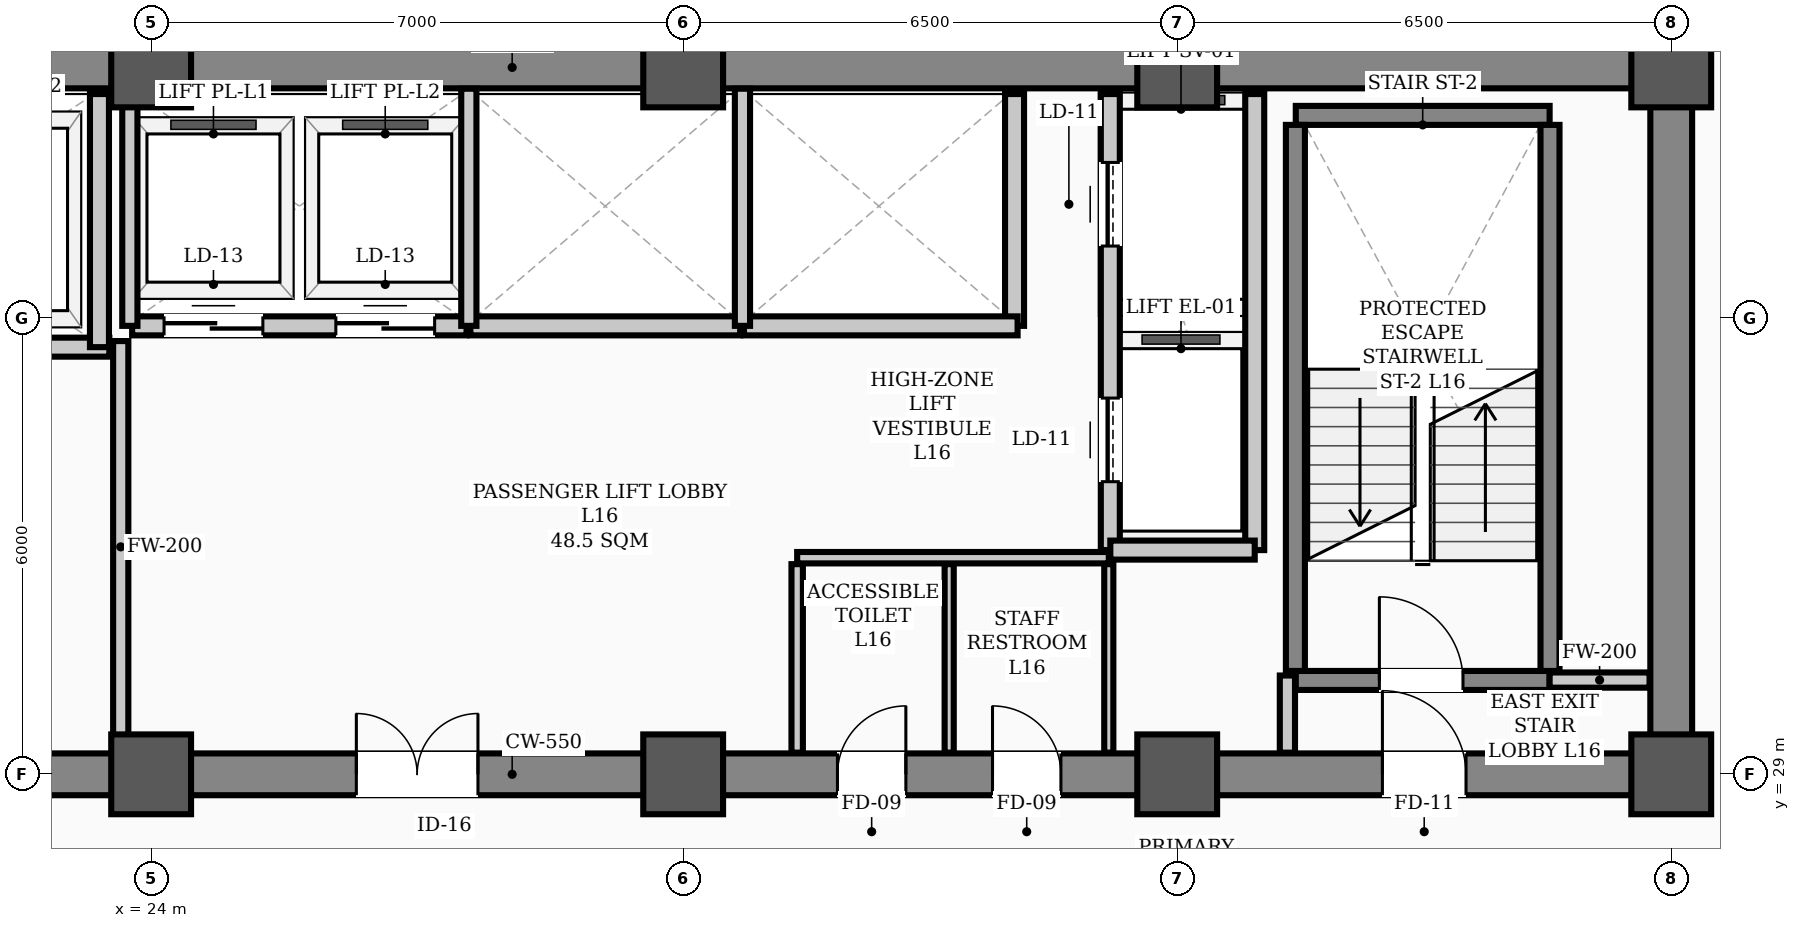
"""IFC4 building model, lengths in metres.
Left out: names, types, materials, properties, quantities, classifications, styles, units other than length and angle.
Written with IfcOpenShell. Run it as: python <this file> out.ifc"""

import sys

from ifc_helpers import new_model, si_unit, direction, frame, frame_2d, origin, origin_2d, place, context, subcontext, project, spatial, rectangle, hollow_rectangle, extrude, element, fill, save


model = new_model("IFC4")
c1 = context("Model", 3, precision=1e-05, world=origin(), true_north=direction((0.0, 1.0)))
c2 = subcontext(c1, "Body", "Model", "MODEL_VIEW")
j1 = project(units=[si_unit("LENGTHUNIT", "METRE"), si_unit("PLANEANGLEUNIT", "RADIAN")], contexts=[c1])
p1 = place(None, origin())
s1 = spatial("IfcSite", under=j1, at=p1, CompositionType="ELEMENT")
p2 = place(p1, origin())
s2 = spatial("IfcBuilding", under=s1, at=p2, CompositionType="ELEMENT")
p3 = place(p2, frame((0.0, 0.0, 65.5)))
s3 = spatial("IfcBuildingStorey", under=s2, at=p3, CompositionType="ELEMENT", Elevation=65.5)
for number, where, z_axis, x_axis in (
    (1, (24.0, 29.0, 0.0), (0.0, 0.0, 1.0), (1.0, 0.0, 0.0)),
    (2, (24.0, 38.3, 0.0), (0.0, 0.0, 1.0), (1.0, 0.0, 0.0)),
    (3, (31.0, 29.0, 0.0), (0.0, 0.0, 1.0), (1.0, 0.0, 0.0)),
    (4, (31.0, 38.3, 0.0), (0.0, 0.0, 1.0), (1.0, 0.0, 0.0)),
    (5, (37.5, 29.0, 0.0), (0.0, 0.0, 1.0), (1.0, 0.0, 0.0)),
    (6, (37.5, 38.3, 0.0), (0.0, 0.0, 1.0), (1.0, 0.0, 0.0)),
    (7, (44.0, 29.0, 0.0), (0.0, 0.0, 1.0), (1.0, 0.0, 0.0)),
    (8, (44.0, 38.3, 0.0), (0.0, 0.0, 1.0), (1.0, 0.0, 0.0)),
):
    element("IfcColumn", number, at=place(p3, frame(where, z_axis=z_axis, x_axis=x_axis)), inside=s3, PredefinedType="COLUMN", context=c2, shape_type="SweptSolid", body=[
        extrude(hollow_rectangle(XDim=1.05, YDim=1.05, WallThickness=0.038, InnerFilletRadius=0.019, OuterFilletRadius=0.057, at=origin_2d()), origin(), (0.0, 0.0, 1.0), 3.9),
    ])
p4 = place(p3, frame((13.5, 29.0, 0.0), z_axis=(0.0, 0.0, 1.0), x_axis=(1.0, 0.0, 0.0)))
e9 = element("IfcWall", 9, at=p4, inside=s3, PredefinedType="SHEAR", context=c2, shape_type="SweptSolid", body=[
    extrude(rectangle(XDim=30.5, YDim=0.55, at=frame_2d((15.25, 0.0))), origin(), (0.0, 0.0, 1.0), 3.72),
])
p5 = place(p4, frame((1.75, 0.0, 0.0)))
e10 = element("IfcOpeningElement", 10, at=p5, cuts=e9, PredefinedType="OPENING", context=c2, shape_type="SweptSolid", body=[
    extrude(rectangle(XDim=1.1, YDim=2.08, at=frame_2d((0.55, 1.04))), frame((0.0, 0.285, 0.0), z_axis=(0.0, -1.0, 0.0), x_axis=(1.0, 0.0, 0.0)), (0.0, 0.0, 1.0), 0.57),
])
p6 = place(p4, frame((26.7, 0.0, 0.0)))
e11 = element("IfcOpeningElement", 11, at=p6, cuts=e9, PredefinedType="OPENING", context=c2, shape_type="SweptSolid", body=[
    extrude(rectangle(XDim=1.1, YDim=2.08, at=frame_2d((0.55, 1.04))), frame((0.0, 0.285, 0.0), z_axis=(0.0, -1.0, 0.0), x_axis=(1.0, 0.0, 0.0)), (0.0, 0.0, 1.0), 0.57),
])
p7 = place(p4, frame((6.8, 0.0, 0.0)))
e12 = element("IfcOpeningElement", 12, at=p7, cuts=e9, PredefinedType="OPENING", context=c2, shape_type="SweptSolid", body=[
    extrude(rectangle(XDim=1.1, YDim=2.08, at=frame_2d((0.55, 1.04))), frame((0.0, 0.285, 0.0), z_axis=(0.0, -1.0, 0.0), x_axis=(1.0, 0.0, 0.0)), (0.0, 0.0, 1.0), 0.57),
])
p8 = place(p4, frame((13.2, 0.0, 0.0)))
e13 = element("IfcOpeningElement", 13, at=p8, cuts=e9, PredefinedType="OPENING", context=c2, shape_type="SweptSolid", body=[
    extrude(rectangle(XDim=1.6, YDim=2.08, at=frame_2d((0.8, 1.04))), frame((0.0, 0.285, 0.0), z_axis=(0.0, -1.0, 0.0), x_axis=(1.0, 0.0, 0.0)), (0.0, 0.0, 1.0), 0.57),
])
p9 = place(p4, frame((19.53, 0.0, 0.0)))
e14 = element("IfcOpeningElement", 14, at=p9, cuts=e9, PredefinedType="OPENING", context=c2, shape_type="SweptSolid", body=[
    extrude(rectangle(XDim=0.9, YDim=2.08, at=frame_2d((0.45, 1.04))), frame((0.0, 0.285, 0.0), z_axis=(0.0, -1.0, 0.0), x_axis=(1.0, 0.0, 0.0)), (0.0, 0.0, 1.0), 0.57),
])
p10 = place(p4, frame((21.57, 0.0, 0.0)))
e15 = element("IfcOpeningElement", 15, at=p10, cuts=e9, PredefinedType="OPENING", context=c2, shape_type="SweptSolid", body=[
    extrude(rectangle(XDim=0.9, YDim=2.08, at=frame_2d((0.45, 1.04))), frame((0.0, 0.285, 0.0), z_axis=(0.0, -1.0, 0.0), x_axis=(1.0, 0.0, 0.0)), (0.0, 0.0, 1.0), 0.57),
])
p11 = place(p3, frame((13.5, 38.3, 0.0), z_axis=(0.0, 0.0, 1.0), x_axis=(1.0, 0.0, 0.0)))
e16 = element("IfcWall", 16, at=p11, inside=s3, PredefinedType="SHEAR", context=c2, shape_type="SweptSolid", body=[
    extrude(rectangle(XDim=30.5, YDim=0.55, at=frame_2d((15.25, 0.0))), origin(), (0.0, 0.0, 1.0), 3.72),
])
p12 = place(p3, frame((44.0, 29.35, 0.0), z_axis=(0.0, 0.0, 1.0), x_axis=(0.0, 1.0, 0.0)))
e17 = element("IfcWall", 17, at=p12, inside=s3, PredefinedType="SHEAR", context=c2, shape_type="SweptSolid", body=[
    extrude(rectangle(XDim=8.6, YDim=0.55, at=frame_2d((4.3, 0.0))), origin(), (0.0, 0.0, 1.0), 3.72),
])
p13 = place(p3, frame((39.06, 30.235, 0.0), z_axis=(0.0, 0.0, 1.0), x_axis=(1.0, 0.0, 0.0)))
e18 = element("IfcWall", 18, at=p13, inside=s3, PredefinedType="STANDARD", context=c2, shape_type="SweptSolid", body=[
    extrude(rectangle(XDim=3.34, YDim=0.25, at=frame_2d((1.67, 0.0))), origin(), (0.0, 0.0, 1.0), 3.72),
])
p14 = place(p13, frame((1.1, 0.0, 0.0)))
e19 = element("IfcOpeningElement", 19, at=p14, cuts=e18, PredefinedType="OPENING", context=c2, shape_type="SweptSolid", body=[
    extrude(rectangle(XDim=1.1, YDim=2.08, at=frame_2d((0.55, 1.04))), frame((0.0, 0.135, 0.0), z_axis=(0.0, -1.0, 0.0), x_axis=(1.0, 0.0, 0.0)), (0.0, 0.0, 1.0), 0.27),
])
p15 = place(p3, frame((39.06, 37.669, 0.0), z_axis=(0.0, 0.0, 1.0), x_axis=(1.0, 0.0, 0.0)))
e20 = element("IfcWall", 20, at=p15, inside=s3, PredefinedType="STANDARD", context=c2, shape_type="SweptSolid", body=[
    extrude(rectangle(XDim=3.34, YDim=0.25, at=frame_2d((1.67, 0.0))), origin(), (0.0, 0.0, 1.0), 3.72),
])
for number, where, z_axis, x_axis in (
    (21, (39.055, 30.36, 0.0), (0.0, 0.0, 1.0), (0.0, 1.0, 0.0)),
    (22, (42.405, 30.36, 0.0), (0.0, 0.0, 1.0), (0.0, 1.0, 0.0)),
):
    element("IfcWall", number, at=place(p3, frame(where, z_axis=z_axis, x_axis=x_axis)), inside=s3, PredefinedType="STANDARD", context=c2, shape_type="SweptSolid", body=[
        extrude(rectangle(XDim=7.184, YDim=0.25, at=frame_2d((3.592, 0.0))), origin(), (0.0, 0.0, 1.0), 3.72),
    ])
p16 = place(p3, frame((18.1, 34.62, 0.0), z_axis=(0.0, 0.0, 1.0), x_axis=(1.0, 0.0, 0.0)))
e23 = element("IfcWall", 23, at=p16, inside=s3, PredefinedType="STANDARD", context=c2, shape_type="SweptSolid", body=[
    extrude(rectangle(XDim=5.35, YDim=0.25, at=frame_2d((2.675, 0.0))), origin(), (0.0, 0.0, 1.0), 3.72),
])
p17 = place(p16, frame((0.85, 0.0, 0.0)))
e24 = element("IfcOpeningElement", 24, at=p17, cuts=e23, PredefinedType="OPENING", context=c2, shape_type="SweptSolid", body=[
    extrude(rectangle(XDim=1.1, YDim=2.08, at=frame_2d((0.55, 1.04))), frame((0.0, 0.135, 0.0), z_axis=(0.0, -1.0, 0.0), x_axis=(1.0, 0.0, 0.0)), (0.0, 0.0, 1.0), 0.27),
])
p18 = place(p16, frame((3.45, 0.0, 0.0)))
e25 = element("IfcOpeningElement", 25, at=p18, cuts=e23, PredefinedType="OPENING", context=c2, shape_type="SweptSolid", body=[
    extrude(rectangle(XDim=1.1, YDim=2.08, at=frame_2d((0.55, 1.04))), frame((0.0, 0.135, 0.0), z_axis=(0.0, -1.0, 0.0), x_axis=(1.0, 0.0, 0.0)), (0.0, 0.0, 1.0), 0.27),
])
p19 = place(p3, frame((36.62, 31.95, 0.0), z_axis=(0.0, 0.0, 1.0), x_axis=(0.0, 1.0, 0.0)))
e26 = element("IfcWall", 26, at=p19, inside=s3, PredefinedType="STANDARD", context=c2, shape_type="SweptSolid", body=[
    extrude(rectangle(XDim=6.0, YDim=0.25, at=frame_2d((3.0, 0.0))), origin(), (0.0, 0.0, 1.0), 3.3),
])
p20 = place(p19, frame((0.9, 0.0, 0.0)))
e27 = element("IfcOpeningElement", 27, at=p20, cuts=e26, PredefinedType="OPENING", context=c2, shape_type="SweptSolid", body=[
    extrude(rectangle(XDim=1.1, YDim=2.08, at=frame_2d((0.55, 1.04))), frame((0.0, 0.135, 0.0), z_axis=(0.0, -1.0, 0.0), x_axis=(1.0, 0.0, 0.0)), (0.0, 0.0, 1.0), 0.27),
])
p21 = place(p19, frame((4.0, 0.0, 0.0)))
e28 = element("IfcOpeningElement", 28, at=p21, cuts=e26, PredefinedType="OPENING", context=c2, shape_type="SweptSolid", body=[
    extrude(rectangle(XDim=1.1, YDim=2.08, at=frame_2d((0.55, 1.04))), frame((0.0, 0.135, 0.0), z_axis=(0.0, -1.0, 0.0), x_axis=(1.0, 0.0, 0.0)), (0.0, 0.0, 1.0), 0.27),
])
p22 = place(p3, frame((38.52, 31.95, 0.0), z_axis=(0.0, 0.0, 1.0), x_axis=(0.0, 1.0, 0.0)))
e29 = element("IfcWall", 29, at=p22, inside=s3, PredefinedType="STANDARD", context=c2, shape_type="SweptSolid", body=[
    extrude(rectangle(XDim=6.0, YDim=0.25, at=frame_2d((3.0, 0.0))), origin(), (0.0, 0.0, 1.0), 3.3),
])
p23 = place(p3, frame((36.62, 31.95, 0.0), z_axis=(0.0, 0.0, 1.0), x_axis=(1.0, 0.0, 0.0)))
e30 = element("IfcWall", 30, at=p23, inside=s3, PredefinedType="STANDARD", context=c2, shape_type="SweptSolid", body=[
    extrude(rectangle(XDim=1.9, YDim=0.25, at=frame_2d((0.95, 0.0))), origin(), (0.0, 0.0, 1.0), 3.48),
])
p24 = place(p3, frame((23.32, 34.62, 0.0), z_axis=(0.0, 0.0, 1.0), x_axis=(0.0, 1.0, 0.0)))
e31 = element("IfcWall", 31, at=p24, inside=s3, PredefinedType="STANDARD", context=c2, shape_type="SweptSolid", body=[
    extrude(rectangle(XDim=3.33, YDim=0.25, at=frame_2d((1.665, 0.0))), origin(), (0.0, 0.0, 1.0), 3.3),
])
p25 = place(p3, frame((35.36, 34.9, 0.0), z_axis=(0.0, 0.0, 1.0), x_axis=(0.0, 1.0, 0.0)))
e32 = element("IfcWall", 32, at=p25, inside=s3, PredefinedType="STANDARD", context=c2, shape_type="SweptSolid", body=[
    extrude(rectangle(XDim=3.05, YDim=0.25, at=frame_2d((1.525, 0.0))), origin(), (0.0, 0.0, 1.0), 3.3),
])
p26 = place(p3, frame((23.75, 34.9, 0.0), z_axis=(0.0, 0.0, 1.0), x_axis=(1.0, 0.0, 0.0)))
e33 = element("IfcWall", 33, at=p26, inside=s3, PredefinedType="STANDARD", context=c2, shape_type="SweptSolid", body=[
    extrude(rectangle(XDim=4.4, YDim=0.25, at=frame_2d((2.2, 0.0))), origin(), (0.0, 0.0, 1.0), 3.72),
])
p27 = place(p26, frame((0.42, 0.0, 0.0)))
e34 = element("IfcOpeningElement", 34, at=p27, cuts=e33, PredefinedType="OPENING", context=c2, shape_type="SweptSolid", body=[
    extrude(rectangle(XDim=1.3, YDim=2.08, at=frame_2d((0.65, 1.04))), frame((0.0, 0.135, 0.0), z_axis=(0.0, -1.0, 0.0), x_axis=(1.0, 0.0, 0.0)), (0.0, 0.0, 1.0), 0.27),
])
p28 = place(p26, frame((2.68, 0.0, 0.0)))
e35 = element("IfcOpeningElement", 35, at=p28, cuts=e33, PredefinedType="OPENING", context=c2, shape_type="SweptSolid", body=[
    extrude(rectangle(XDim=1.3, YDim=2.08, at=frame_2d((0.65, 1.04))), frame((0.0, 0.135, 0.0), z_axis=(0.0, -1.0, 0.0), x_axis=(1.0, 0.0, 0.0)), (0.0, 0.0, 1.0), 0.27),
])
p29 = place(p3, frame((28.2, 34.9, 0.0), z_axis=(0.0, 0.0, 1.0), x_axis=(1.0, 0.0, 0.0)))
e36 = element("IfcWall", 36, at=p29, inside=s3, PredefinedType="STANDARD", context=c2, shape_type="SweptSolid", body=[
    extrude(rectangle(XDim=3.55, YDim=0.25, at=frame_2d((1.775, 0.0))), origin(), (0.0, 0.0, 1.0), 3.72),
])
p30 = place(p3, frame((31.8, 34.9, 0.0), z_axis=(0.0, 0.0, 1.0), x_axis=(1.0, 0.0, 0.0)))
e37 = element("IfcWall", 37, at=p30, inside=s3, PredefinedType="STANDARD", context=c2, shape_type="SweptSolid", body=[
    extrude(rectangle(XDim=3.6, YDim=0.25, at=frame_2d((1.8, 0.0))), origin(), (0.0, 0.0, 1.0), 3.72),
])
p31 = place(p3, frame((42.4, 30.24, 0.0), z_axis=(0.0, 0.0, 1.0), x_axis=(1.0, 0.0, 0.0)))
e38 = element("IfcWall", 38, at=p31, inside=s3, PredefinedType="STANDARD", context=c2, shape_type="SweptSolid", body=[
    extrude(rectangle(XDim=1.315, YDim=0.2, at=frame_2d((0.658, 0.0))), origin(), (0.0, 0.0, 1.0), 3.1),
])
p32 = place(p3, frame((32.5, 31.85, 0.0), z_axis=(0.0, 0.0, 1.0), x_axis=(1.0, 0.0, 0.0)))
e39 = element("IfcWall", 39, at=p32, inside=s3, PredefinedType="PARTITIONING", context=c2, shape_type="SweptSolid", body=[
    extrude(rectangle(XDim=4.1, YDim=0.15, at=frame_2d((2.05, 0.0))), origin(), (0.0, 0.0, 1.0), 3.72),
])
p33 = place(p3, frame((38.95, 29.285, 0.0), z_axis=(0.0, 0.0, 1.0), x_axis=(0.0, 1.0, 0.0)))
e40 = element("IfcWall", 40, at=p33, inside=s3, PredefinedType="STANDARD", context=c2, shape_type="SweptSolid", body=[
    extrude(rectangle(XDim=1.015, YDim=0.2, at=frame_2d((0.508, 0.0))), origin(), (0.0, 0.0, 1.0), 3.3),
])
p34 = place(p3, frame((23.6, 29.285, 0.0), z_axis=(0.0, 0.0, 1.0), x_axis=(0.0, 1.0, 0.0)))
e41 = element("IfcWall", 41, at=p34, inside=s3, PredefinedType="STANDARD", context=c2, shape_type="SweptSolid", body=[
    extrude(rectangle(XDim=5.415, YDim=0.2, at=frame_2d((2.708, 0.0))), origin(), (0.0, 0.0, 1.0), 3.1),
])
p35 = place(p3, frame((32.5, 29.285, 0.0), z_axis=(0.0, 0.0, 1.0), x_axis=(0.0, 1.0, 0.0)))
e42 = element("IfcWall", 42, at=p35, inside=s3, PredefinedType="PARTITIONING", context=c2, shape_type="SweptSolid", body=[
    extrude(rectangle(XDim=2.48, YDim=0.15, at=frame_2d((1.24, 0.0))), origin(), (0.0, 0.0, 1.0), 3.3),
])
for number, where, z_axis, x_axis in (
    (43, (36.6, 29.285, 0.0), (0.0, 0.0, 1.0), (0.0, 1.0, 0.0)),
    (44, (34.5, 29.285, 0.0), (0.0, 0.0, 1.0), (0.0, 1.0, 0.0)),
):
    element("IfcWall", number, at=place(p3, frame(where, z_axis=z_axis, x_axis=x_axis)), inside=s3, PredefinedType="PARTITIONING", context=c2, shape_type="SweptSolid", body=[
        extrude(rectangle(XDim=2.48, YDim=0.12, at=frame_2d((1.24, 0.0))), origin(), (0.0, 0.0, 1.0), 3.3),
    ])
p36 = place(p3, frame((23.72, 34.9, 0.0), z_axis=(0.0, 0.0, 1.0), x_axis=(0.0, 1.0, 0.0)))
e45 = element("IfcWall", 45, at=p36, inside=s3, PredefinedType="STANDARD", context=c2, shape_type="SweptSolid", body=[
    extrude(rectangle(XDim=3.12, YDim=0.2, at=frame_2d((1.56, 0.0))), origin(), (0.0, 0.0, 1.0), 3.1),
])
for number, where, z_axis, x_axis in (
    (46, (28.18, 34.9, 0.0), (0.0, 0.0, 1.0), (0.0, 1.0, 0.0)),
    (47, (31.78, 34.9, 0.0), (0.0, 0.0, 1.0), (0.0, 1.0, 0.0)),
):
    element("IfcWall", number, at=place(p3, frame(where, z_axis=z_axis, x_axis=x_axis)), inside=s3, PredefinedType="STANDARD", context=c2, shape_type="SweptSolid", body=[
        extrude(rectangle(XDim=3.12, YDim=0.2, at=frame_2d((1.56, 0.0))), origin(), (0.0, 0.0, 1.0), 3.3),
    ])
p37 = place(p14, origin())
e48 = element("IfcDoor", 48, at=p37, inside=s3, OperationType="SINGLE_SWING_LEFT", PredefinedType="DOOR", context=c2, shape_type="SweptSolid", body=[
    extrude(rectangle(XDim=1.1, YDim=2.08, at=frame_2d((0.55, 1.04))), frame((0.0, 0.025, 0.0), z_axis=(0.0, -1.0, 0.0), x_axis=(1.0, 0.0, 0.0)), (0.0, 0.0, 1.0), 0.05),
])
fill(e19, e48)
p38 = place(p6, origin())
e49 = element("IfcDoor", 49, at=p38, inside=s3, OperationType="SINGLE_SWING_LEFT", PredefinedType="DOOR", context=c2, shape_type="SweptSolid", body=[
    extrude(rectangle(XDim=1.1, YDim=2.08, at=frame_2d((0.55, 1.04))), frame((0.0, 0.025, 0.0), z_axis=(0.0, -1.0, 0.0), x_axis=(1.0, 0.0, 0.0)), (0.0, 0.0, 1.0), 0.05),
])
fill(e11, e49)
p39 = place(p8, origin())
e50 = element("IfcDoor", 50, at=p39, inside=s3, OperationType="DOUBLE_DOOR_SINGLE_SWING", PredefinedType="DOOR", context=c2, shape_type="SweptSolid", body=[
    extrude(rectangle(XDim=1.6, YDim=2.08, at=frame_2d((0.8, 1.04))), frame((0.0, 0.025, 0.0), z_axis=(0.0, -1.0, 0.0), x_axis=(1.0, 0.0, 0.0)), (0.0, 0.0, 1.0), 0.05),
])
fill(e13, e50)
p40 = place(p9, origin())
e51 = element("IfcDoor", 51, at=p40, inside=s3, OperationType="SINGLE_SWING_RIGHT", PredefinedType="DOOR", context=c2, shape_type="SweptSolid", body=[
    extrude(rectangle(XDim=0.9, YDim=2.08, at=frame_2d((0.45, 1.04))), frame((0.0, 0.025, 0.0), z_axis=(0.0, -1.0, 0.0), x_axis=(1.0, 0.0, 0.0)), (0.0, 0.0, 1.0), 0.05),
])
fill(e14, e51)
p41 = place(p10, origin())
e52 = element("IfcDoor", 52, at=p41, inside=s3, OperationType="SINGLE_SWING_LEFT", PredefinedType="DOOR", context=c2, shape_type="SweptSolid", body=[
    extrude(rectangle(XDim=0.9, YDim=2.08, at=frame_2d((0.45, 1.04))), frame((0.0, 0.025, 0.0), z_axis=(0.0, -1.0, 0.0), x_axis=(1.0, 0.0, 0.0)), (0.0, 0.0, 1.0), 0.05),
])
fill(e15, e52)
p42 = place(p20, origin())
e53 = element("IfcDoor", 53, at=p42, inside=s3, OperationType="SLIDING_TO_LEFT", PredefinedType="DOOR", context=c2, shape_type="SweptSolid", body=[
    extrude(rectangle(XDim=1.1, YDim=2.08, at=frame_2d((0.55, 1.04))), frame((0.0, 0.025, 0.0), z_axis=(0.0, -1.0, 0.0), x_axis=(1.0, 0.0, 0.0)), (0.0, 0.0, 1.0), 0.05),
])
fill(e27, e53)
p43 = place(p21, origin())
e54 = element("IfcDoor", 54, at=p43, inside=s3, OperationType="SLIDING_TO_LEFT", PredefinedType="DOOR", context=c2, shape_type="SweptSolid", body=[
    extrude(rectangle(XDim=1.1, YDim=2.08, at=frame_2d((0.55, 1.04))), frame((0.0, 0.025, 0.0), z_axis=(0.0, -1.0, 0.0), x_axis=(1.0, 0.0, 0.0)), (0.0, 0.0, 1.0), 0.05),
])
fill(e28, e54)
p44 = place(p27, origin())
e55 = element("IfcDoor", 55, at=p44, inside=s3, OperationType="DOUBLE_DOOR_SLIDING", PredefinedType="DOOR", context=c2, shape_type="SweptSolid", body=[
    extrude(rectangle(XDim=1.3, YDim=2.08, at=frame_2d((0.65, 1.04))), frame((0.0, 0.025, 0.0), z_axis=(0.0, -1.0, 0.0), x_axis=(1.0, 0.0, 0.0)), (0.0, 0.0, 1.0), 0.05),
])
fill(e34, e55)
p45 = place(p28, origin())
e56 = element("IfcDoor", 56, at=p45, inside=s3, OperationType="DOUBLE_DOOR_SLIDING", PredefinedType="DOOR", context=c2, shape_type="SweptSolid", body=[
    extrude(rectangle(XDim=1.3, YDim=2.08, at=frame_2d((0.65, 1.04))), frame((0.0, 0.025, 0.0), z_axis=(0.0, -1.0, 0.0), x_axis=(1.0, 0.0, 0.0)), (0.0, 0.0, 1.0), 0.05),
])
fill(e35, e56)
save(model, sys.argv[1])
